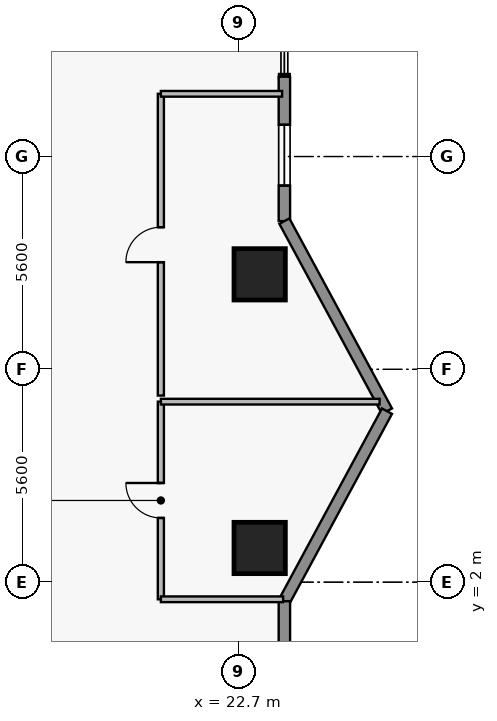
"""IFC4 building model, lengths in metres.
Left out: names, types, materials, properties, quantities, classifications, styles, units other than length and angle.
Written with IfcOpenShell. Run it as: python <this file> out.ifc"""

import sys

from ifc_helpers import new_model, si_unit, direction, frame, frame_2d, origin, origin_2d, place, context, subcontext, project, spatial, rectangle, extrude, element, fill, save


model = new_model("IFC4")
c1 = context("Model", 3, precision=1e-05, world=origin(), true_north=direction((0.0, 1.0)))
c2 = subcontext(c1, "Body", "Model", "MODEL_VIEW")
j1 = project(units=[si_unit("LENGTHUNIT", "METRE"), si_unit("PLANEANGLEUNIT", "RADIAN")], contexts=[c1])
p1 = place(None, origin())
s1 = spatial("IfcSite", under=j1, at=p1, CompositionType="ELEMENT")
p2 = place(p1, origin())
s2 = spatial("IfcBuilding", under=s1, at=p2, CompositionType="ELEMENT")
p3 = place(p2, frame((0.0, 0.0, 110.25)))
s3 = spatial("IfcBuildingStorey", under=s2, at=p3, CompositionType="ELEMENT", Elevation=110.25)
for number, where, z_axis, x_axis in (
    (1, (23.25, 2.9, 0.0), (0.0, 0.0, 1.0), (1.0, 0.0, 0.0)),
    (2, (23.25, 10.1, 0.0), (0.0, 0.0, 1.0), (1.0, 0.0, 0.0)),
):
    element("IfcColumn", number, at=place(p3, frame(where, z_axis=z_axis, x_axis=x_axis)), inside=s3, PredefinedType="COLUMN", context=c2, shape_type="SweptSolid", body=[
        extrude(rectangle(XDim=1.35, YDim=1.35, at=origin_2d()), origin(), (0.0, 0.0, 1.0), 3.65),
    ])
p4 = place(p3, frame((23.9, 15.3, 0.0), z_axis=(0.0, 0.0, 1.0), x_axis=(0.0, -1.0, 0.0)))
e3 = element("IfcWall", 3, at=p4, inside=s3, PredefinedType="STANDARD", context=c2, shape_type="SweptSolid", body=[
    extrude(rectangle(XDim=3.8, YDim=0.3, at=frame_2d((1.9, 0.0))), origin(), (0.0, 0.0, 1.0), 3.43),
])
p5 = place(p4, frame((1.265, 0.0, 0.85)))
e4 = element("IfcOpeningElement", 4, at=p5, cuts=e3, PredefinedType="OPENING", context=c2, shape_type="SweptSolid", body=[
    extrude(rectangle(XDim=1.6, YDim=1.8, at=frame_2d((0.8, 0.9))), frame((0.0, 0.16, 0.0), z_axis=(0.0, -1.0, 0.0), x_axis=(1.0, 0.0, 0.0)), (0.0, 0.0, 1.0), 0.32),
])
for number, where, z_axis, x_axis in (
    (5, (23.9, 11.5, 0.0), (0.0, 0.0, 1.0), (0.475, -0.88, 0.0)),
    (6, (26.6, 6.5, 0.0), (0.0, 0.0, 1.0), (-0.475, -0.88, 0.0)),
):
    element("IfcWall", number, at=place(p3, frame(where, z_axis=z_axis, x_axis=x_axis)), inside=s3, PredefinedType="STANDARD", context=c2, shape_type="SweptSolid", body=[
        extrude(rectangle(XDim=5.683, YDim=0.3, at=frame_2d((2.841, 0.0))), origin(), (0.0, 0.0, 1.0), 3.43),
    ])
p6 = place(p3, frame((23.9, 1.5, 0.0), z_axis=(0.0, 0.0, 1.0), x_axis=(0.0, -1.0, 0.0)))
e7 = element("IfcWall", 7, at=p6, inside=s3, PredefinedType="STANDARD", context=c2, shape_type="SweptSolid", body=[
    extrude(rectangle(XDim=1.15, YDim=0.3, at=frame_2d((0.575, 0.0))), origin(), (0.0, 0.0, 1.0), 3.43),
])
p7 = place(p3, frame((20.65, 1.55, 0.0), z_axis=(0.0, 0.0, 1.0), x_axis=(0.0, 1.0, 0.0)))
e8 = element("IfcWall", 8, at=p7, inside=s3, PredefinedType="PARTITIONING", context=c2, shape_type="SweptSolid", body=[
    extrude(rectangle(XDim=5.2, YDim=0.16, at=frame_2d((2.6, 0.0))), origin(), (0.0, 0.0, 1.0), 3.43),
])
p8 = place(p7, frame((2.14, 0.0, 0.0)))
e9 = element("IfcOpeningElement", 9, at=p8, cuts=e8, PredefinedType="OPENING", context=c2, shape_type="SweptSolid", body=[
    extrude(rectangle(XDim=0.92, YDim=2.12, at=frame_2d((0.46, 1.06))), frame((0.0, 0.09, 0.0), z_axis=(0.0, -1.0, 0.0), x_axis=(1.0, 0.0, 0.0)), (0.0, 0.0, 1.0), 0.18),
])
p9 = place(p3, frame((20.65, 6.91, 0.0), z_axis=(0.0, 0.0, 1.0), x_axis=(0.0, 1.0, 0.0)))
e10 = element("IfcWall", 10, at=p9, inside=s3, PredefinedType="PARTITIONING", context=c2, shape_type="SweptSolid", body=[
    extrude(rectangle(XDim=7.94, YDim=0.16, at=frame_2d((3.97, 0.0))), origin(), (0.0, 0.0, 1.0), 3.43),
])
p10 = place(p9, frame((3.51, 0.0, 0.0)))
e11 = element("IfcOpeningElement", 11, at=p10, cuts=e10, PredefinedType="OPENING", context=c2, shape_type="SweptSolid", body=[
    extrude(rectangle(XDim=0.92, YDim=2.12, at=frame_2d((0.46, 1.06))), frame((0.0, 0.09, 0.0), z_axis=(0.0, -1.0, 0.0), x_axis=(1.0, 0.0, 0.0)), (0.0, 0.0, 1.0), 0.18),
])
p11 = place(p3, frame((20.65, 1.55, 0.0), z_axis=(0.0, 0.0, 1.0), x_axis=(1.0, 0.0, 0.0)))
e12 = element("IfcWall", 12, at=p11, inside=s3, PredefinedType="PARTITIONING", context=c2, shape_type="SweptSolid", body=[
    extrude(rectangle(XDim=3.217, YDim=0.15, at=frame_2d((1.608, 0.0))), origin(), (0.0, 0.0, 1.0), 3.43),
])
p12 = place(p3, frame((20.65, 6.75, 0.0), z_axis=(0.0, 0.0, 1.0), x_axis=(1.0, 0.0, 0.0)))
e13 = element("IfcWall", 13, at=p12, inside=s3, PredefinedType="PARTITIONING", context=c2, shape_type="SweptSolid", body=[
    extrude(rectangle(XDim=5.755, YDim=0.15, at=frame_2d((2.877, 0.0))), origin(), (0.0, 0.0, 1.0), 3.43),
])
p13 = place(p3, frame((20.65, 14.85, 0.0), z_axis=(0.0, 0.0, 1.0), x_axis=(1.0, 0.0, 0.0)))
e14 = element("IfcWall", 14, at=p13, inside=s3, PredefinedType="PARTITIONING", context=c2, shape_type="SweptSolid", body=[
    extrude(rectangle(XDim=3.19, YDim=0.15, at=frame_2d((1.595, 0.0))), origin(), (0.0, 0.0, 1.0), 3.43),
])
p14 = place(p5, origin())
e15 = element("IfcWindow", 15, at=p14, inside=s3, PartitioningType="SINGLE_PANEL", PredefinedType="WINDOW", context=c2, shape_type="SweptSolid", body=[
    extrude(rectangle(XDim=1.6, YDim=1.8, at=frame_2d((0.8, 0.9))), frame((0.0, 0.03, 0.0), z_axis=(0.0, -1.0, 0.0), x_axis=(1.0, 0.0, 0.0)), (0.0, 0.0, 1.0), 0.06),
])
fill(e4, e15)
p15 = place(p8, origin())
e16 = element("IfcDoor", 16, at=p15, inside=s3, OperationType="SINGLE_SWING_RIGHT", PredefinedType="DOOR", context=c2, shape_type="SweptSolid", body=[
    extrude(rectangle(XDim=0.92, YDim=2.12, at=frame_2d((0.46, 1.06))), frame((0.0, 0.025, 0.0), z_axis=(0.0, -1.0, 0.0), x_axis=(1.0, 0.0, 0.0)), (0.0, 0.0, 1.0), 0.05),
])
fill(e9, e16)
p16 = place(p10, origin())
e17 = element("IfcDoor", 17, at=p16, inside=s3, OperationType="SINGLE_SWING_LEFT", PredefinedType="DOOR", context=c2, shape_type="SweptSolid", body=[
    extrude(rectangle(XDim=0.92, YDim=2.12, at=frame_2d((0.46, 1.06))), frame((0.0, 0.025, 0.0), z_axis=(0.0, -1.0, 0.0), x_axis=(1.0, 0.0, 0.0)), (0.0, 0.0, 1.0), 0.05),
])
fill(e11, e17)
save(model, sys.argv[1])
